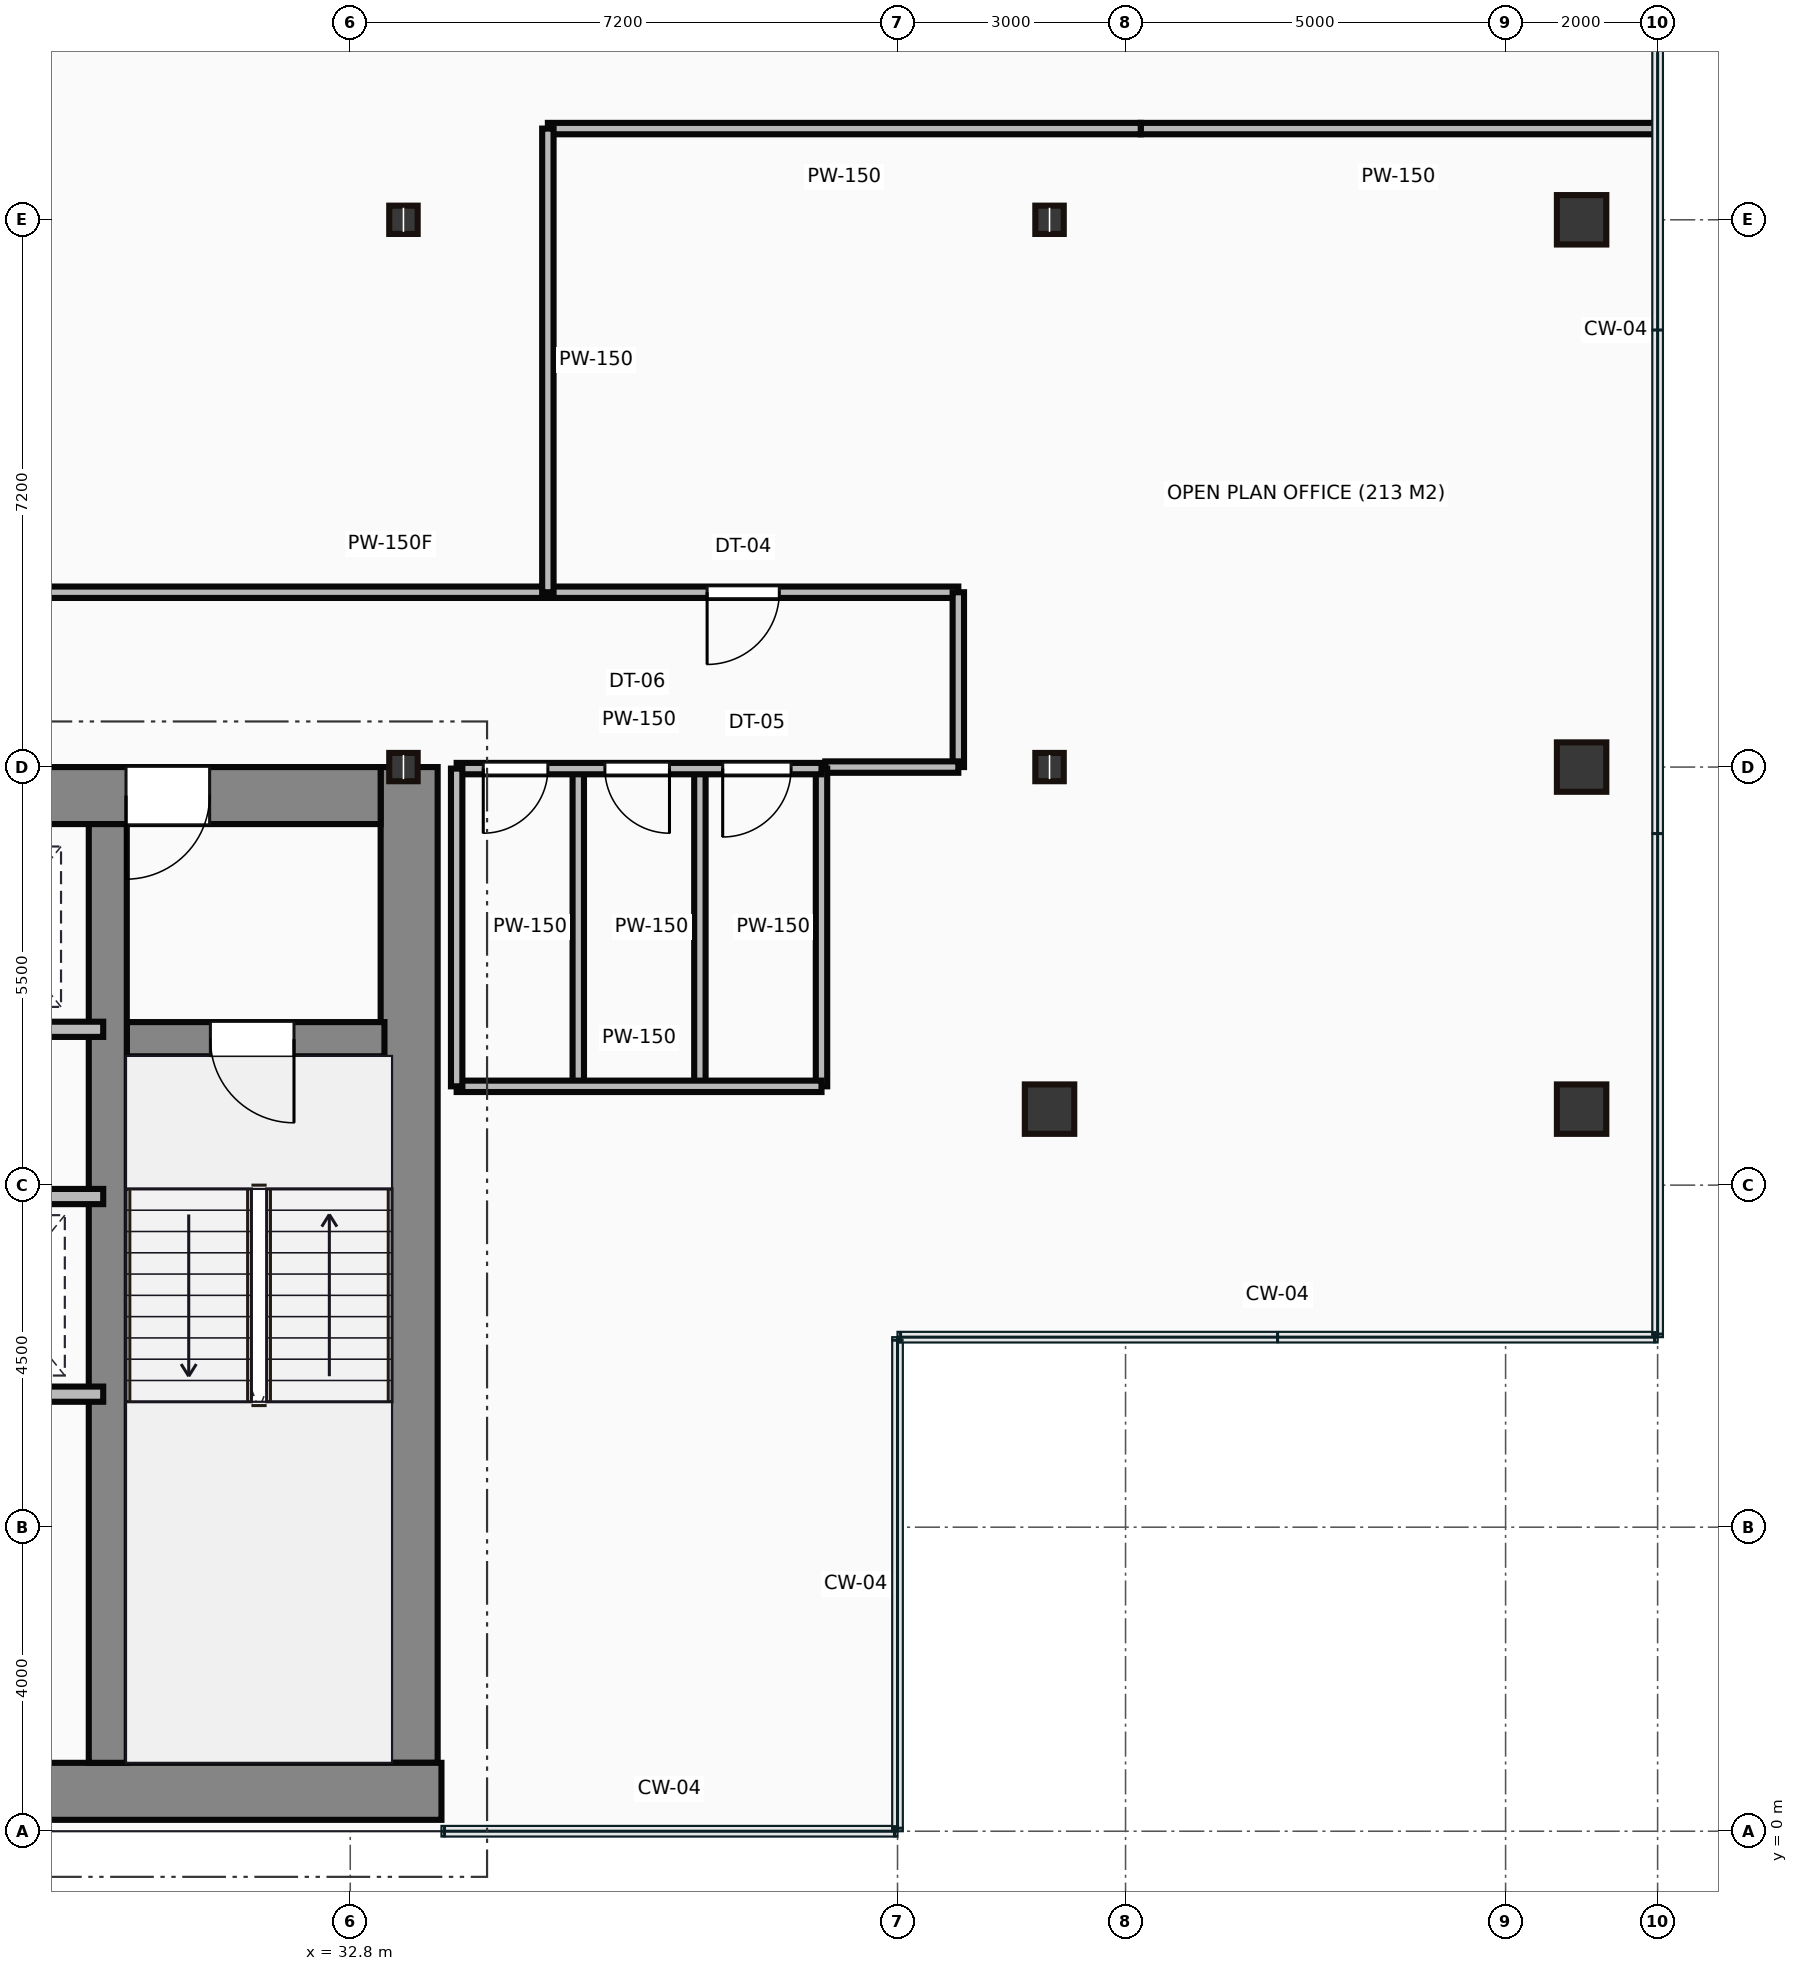
"""IFC4 building model, lengths in metres.
Left out: names, types, materials, properties, quantities, classifications, styles, units other than length and angle.
Written with IfcOpenShell. Run it as: python <this file> out.ifc"""

import sys

from ifc_helpers import new_model, si_unit, direction, frame, frame_2d, origin, origin_2d, place, context, subcontext, project, spatial, rectangle, hollow_rectangle, i_section, extrude, source, transform, mapped, element, fill, save


model = new_model("IFC4")
c1 = context("Model", 3, precision=1e-05, world=origin(), true_north=direction((0.0, 1.0)))
c2 = subcontext(c1, "Body", "Model", "MODEL_VIEW")
j1 = project(units=[si_unit("LENGTHUNIT", "METRE"), si_unit("PLANEANGLEUNIT", "RADIAN")], contexts=[c1])
p1 = place(None, origin())
s1 = spatial("IfcSite", under=j1, at=p1, CompositionType="ELEMENT")
p2 = place(p1, origin())
s2 = spatial("IfcBuilding", under=s1, at=p2, CompositionType="ELEMENT")
p3 = place(p2, frame((0.0, 0.0, 162.5)))
s3 = spatial("IfcBuildingStorey", under=s2, at=p3, CompositionType="ELEMENT", Elevation=162.5)
m1 = source(origin(), c2, "Body", "SweptSolid", [
    extrude(rectangle(XDim=29.5, YDim=0.75, at=frame_2d((14.75, 0.0))), origin(), (0.0, 0.0, 1.0), 3.65),
])
p4 = place(p3, frame((4.5, 0.525, 0.0), z_axis=(0.0, 0.0, 1.0), x_axis=(1.0, 0.0, 0.0)))
e1 = element("IfcWall", 1, at=p4, inside=s3, PredefinedType="SHEAR", context=c2, shape_type="MappedRepresentation", body=[
    mapped(m1, transform((0.0, 0.0, 0.0))),
])
m2 = source(origin(), c2, "Body", "SweptSolid", [
    extrude(rectangle(XDim=13.1, YDim=0.75, at=frame_2d((6.55, 0.0))), origin(), (0.0, 0.0, 1.0), 3.65),
])
p5 = place(p3, frame((33.575, 0.9, 0.0), z_axis=(0.0, 0.0, 1.0), x_axis=(0.0, 1.0, 0.0)))
e2 = element("IfcWall", 2, at=p5, inside=s3, PredefinedType="SHEAR", context=c2, shape_type="MappedRepresentation", body=[
    mapped(m2, transform((0.0, 0.0, 0.0))),
])
m3 = source(origin(), c2, "Body", "SweptSolid", [
    extrude(rectangle(XDim=12.6, YDim=0.75, at=frame_2d((6.3, 0.0))), origin(), (0.0, 0.0, 1.0), 3.65),
])
p6 = place(p3, frame((20.6, 13.625, 0.0), z_axis=(0.0, 0.0, 1.0), x_axis=(1.0, 0.0, 0.0)))
e3 = element("IfcWall", 3, at=p6, inside=s3, PredefinedType="SHEAR", context=c2, shape_type="MappedRepresentation", body=[
    mapped(m3, transform((0.0, 0.0, 0.0))),
])
p7 = place(p6, frame((9.25, 0.0, 0.0)))
e4 = element("IfcOpeningElement", 4, at=p7, cuts=e3, PredefinedType="OPENING", context=c2, shape_type="SweptSolid", body=[
    extrude(rectangle(XDim=1.1, YDim=2.15, at=frame_2d((0.55, 1.075))), frame((0.0, 0.385, 0.0), z_axis=(0.0, -1.0, 0.0), x_axis=(1.0, 0.0, 0.0)), (0.0, 0.0, 1.0), 0.77),
])
m4 = source(origin(), c2, "Body", "SweptSolid", [
    extrude(rectangle(XDim=12.35, YDim=0.5, at=frame_2d((6.175, 0.0))), origin(), (0.0, 0.0, 1.0), 3.65),
])
p8 = place(p3, frame((29.61, 0.9, 0.0), z_axis=(0.0, 0.0, 1.0), x_axis=(0.0, 1.0, 0.0)))
e5 = element("IfcWall", 5, at=p8, inside=s3, PredefinedType="SHEAR", context=c2, shape_type="MappedRepresentation", body=[
    mapped(m4, transform((0.0, 0.0, 0.0))),
])
m5 = source(origin(), c2, "Body", "SweptSolid", [
    extrude(rectangle(XDim=3.39, YDim=0.45, at=frame_2d((1.695, 0.0))), origin(), (0.0, 0.0, 1.0), 3.65),
])
p9 = place(p3, frame((29.86, 10.42, 0.0), z_axis=(0.0, 0.0, 1.0), x_axis=(1.0, 0.0, 0.0)))
e6 = element("IfcWall", 6, at=p9, inside=s3, PredefinedType="SHEAR", context=c2, shape_type="MappedRepresentation", body=[
    mapped(m5, transform((0.0, 0.0, 0.0))),
])
p10 = place(p9, frame((1.1, 0.0, 0.0)))
e7 = element("IfcOpeningElement", 7, at=p10, cuts=e6, PredefinedType="OPENING", context=c2, shape_type="SweptSolid", body=[
    extrude(rectangle(XDim=1.1, YDim=2.15, at=frame_2d((0.55, 1.075))), frame((0.0, 0.235, 0.0), z_axis=(0.0, -1.0, 0.0), x_axis=(1.0, 0.0, 0.0)), (0.0, 0.0, 1.0), 0.47),
])
m6 = source(origin(), c2, "Body", "SweptSolid", [
    extrude(i_section(OverallWidth=0.374, OverallDepth=0.372, WebThickness=0.016, FlangeThickness=0.026, at=origin_2d()), origin(), (0.0, 0.0, 1.0), 3.65),
])
for number, where, z_axis, x_axis in (
    (8, (33.5, 14.0, 0.0), (0.0, 0.0, 1.0), (1.0, 0.0, 0.0)),
    (9, (33.5, 21.2, 0.0), (0.0, 0.0, 1.0), (1.0, 0.0, 0.0)),
):
    element("IfcColumn", number, at=place(p3, frame(where, z_axis=z_axis, x_axis=x_axis)), inside=s3, PredefinedType="COLUMN", context=c2, shape_type="MappedRepresentation", body=[
        mapped(m6, transform((0.0, 0.0, 0.0))),
    ])
m7 = source(origin(), c2, "Body", "SweptSolid", [
    extrude(hollow_rectangle(XDim=0.65, YDim=0.65, WallThickness=0.032, at=origin_2d()), origin(), (0.0, 0.0, 1.0), 3.65),
])
p11 = place(p3, frame((42.0, 9.5, 0.0), z_axis=(0.0, 0.0, 1.0), x_axis=(1.0, 0.0, 0.0)))
e10 = element("IfcColumn", 10, at=p11, inside=s3, PredefinedType="COLUMN", context=c2, shape_type="MappedRepresentation", body=[
    mapped(m7, transform((0.0, 0.0, 0.0))),
])
for number, where, z_axis, x_axis in (
    (11, (42.0, 14.0, 0.0), (0.0, 0.0, 1.0), (1.0, 0.0, 0.0)),
    (12, (42.0, 21.2, 0.0), (0.0, 0.0, 1.0), (1.0, 0.0, 0.0)),
):
    element("IfcColumn", number, at=place(p3, frame(where, z_axis=z_axis, x_axis=x_axis)), inside=s3, PredefinedType="COLUMN", context=c2, shape_type="MappedRepresentation", body=[
        mapped(m6, transform((0.0, 0.0, 0.0))),
    ])
for number, where, z_axis, x_axis in (
    (13, (49.0, 9.5, 0.0), (0.0, 0.0, 1.0), (1.0, 0.0, 0.0)),
    (14, (49.0, 14.0, 0.0), (0.0, 0.0, 1.0), (1.0, 0.0, 0.0)),
    (15, (49.0, 21.2, 0.0), (0.0, 0.0, 1.0), (1.0, 0.0, 0.0)),
):
    element("IfcColumn", number, at=place(p3, frame(where, z_axis=z_axis, x_axis=x_axis)), inside=s3, PredefinedType="COLUMN", context=c2, shape_type="MappedRepresentation", body=[
        mapped(m7, transform((0.0, 0.0, 0.0))),
    ])
m8 = source(origin(), c2, "Body", "SweptSolid", [
    extrude(rectangle(XDim=8.8, YDim=0.2, at=frame_2d((4.4, 0.0))), origin(), (0.0, 0.0, 1.0), 3.4),
])
p12 = place(p3, frame((20.75, 10.55, 0.0), z_axis=(0.0, 0.0, 1.0), x_axis=(1.0, 0.0, 0.0)))
e16 = element("IfcWall", 16, at=p12, inside=s3, PredefinedType="PARTITIONING", context=c2, shape_type="MappedRepresentation", body=[
    mapped(m8, transform((0.0, 0.0, 0.0))),
])
m9 = source(origin(), c2, "Body", "SweptSolid", [
    extrude(rectangle(XDim=4.55, YDim=0.2, at=frame_2d((2.275, 0.0))), origin(), (0.0, 0.0, 1.0), 3.4),
])
for number, where, z_axis, x_axis in (
    (17, (25.0, 8.35, 0.0), (0.0, 0.0, 1.0), (1.0, 0.0, 0.0)),
    (18, (25.0, 5.75, 0.0), (0.0, 0.0, 1.0), (1.0, 0.0, 0.0)),
):
    element("IfcWall", number, at=place(p3, frame(where, z_axis=z_axis, x_axis=x_axis)), inside=s3, PredefinedType="PARTITIONING", context=c2, shape_type="MappedRepresentation", body=[
        mapped(m9, transform((0.0, 0.0, 0.0))),
    ])
m10 = source(origin(), c2, "Body", "SweptSolid", [
    extrude(rectangle(XDim=4.8, YDim=0.15, at=frame_2d((2.4, 0.0))), origin(), (0.0, 0.0, 1.0), 2.76),
])
p13 = place(p3, frame((34.2, 13.98, 0.0), z_axis=(0.0, 0.0, 1.0), x_axis=(1.0, 0.0, 0.0)))
e19 = element("IfcWall", 19, at=p13, inside=s3, PredefinedType="PARTITIONING", context=c2, shape_type="MappedRepresentation", body=[
    mapped(m10, transform((0.0, 0.0, 0.0))),
])
p14 = place(p13, frame((0.35, 0.0, 0.0)))
e20 = element("IfcOpeningElement", 20, at=p14, cuts=e19, PredefinedType="OPENING", context=c2, shape_type="SweptSolid", body=[
    extrude(rectangle(XDim=0.85, YDim=2.1, at=frame_2d((0.425, 1.05))), frame((0.0, 0.085, 0.0), z_axis=(0.0, -1.0, 0.0), x_axis=(1.0, 0.0, 0.0)), (0.0, 0.0, 1.0), 0.17),
])
p15 = place(p13, frame((1.95, 0.0, 0.0)))
e21 = element("IfcOpeningElement", 21, at=p15, cuts=e19, PredefinedType="OPENING", context=c2, shape_type="SweptSolid", body=[
    extrude(rectangle(XDim=0.85, YDim=2.1, at=frame_2d((0.425, 1.05))), frame((0.0, 0.085, 0.0), z_axis=(0.0, -1.0, 0.0), x_axis=(1.0, 0.0, 0.0)), (0.0, 0.0, 1.0), 0.17),
])
p16 = place(p13, frame((3.5, 0.0, 0.0)))
e22 = element("IfcOpeningElement", 22, at=p16, cuts=e19, PredefinedType="OPENING", context=c2, shape_type="SweptSolid", body=[
    extrude(rectangle(XDim=0.9, YDim=2.1, at=frame_2d((0.45, 1.05))), frame((0.0, 0.085, 0.0), z_axis=(0.0, -1.0, 0.0), x_axis=(1.0, 0.0, 0.0)), (0.0, 0.0, 1.0), 0.17),
])
m11 = source(origin(), c2, "Body", "SweptSolid", [
    extrude(rectangle(XDim=4.8, YDim=0.15, at=frame_2d((2.4, 0.0))), origin(), (0.0, 0.0, 1.0), 3.4),
])
p17 = place(p3, frame((34.2, 9.8, 0.0), z_axis=(0.0, 0.0, 1.0), x_axis=(1.0, 0.0, 0.0)))
e23 = element("IfcWall", 23, at=p17, inside=s3, PredefinedType="PARTITIONING", context=c2, shape_type="MappedRepresentation", body=[
    mapped(m11, transform((0.0, 0.0, 0.0))),
])
m12 = source(origin(), c2, "Body", "SweptSolid", [
    extrude(rectangle(XDim=4.18, YDim=0.15, at=frame_2d((2.09, 0.0))), origin(), (0.0, 0.0, 1.0), 3.4),
])
for number, where, z_axis, x_axis in (
    (24, (39.0, 9.8, 0.0), (0.0, 0.0, 1.0), (0.0, 1.0, 0.0)),
    (25, (34.2, 9.8, 0.0), (0.0, 0.0, 1.0), (0.0, 1.0, 0.0)),
    (26, (35.8, 9.8, 0.0), (0.0, 0.0, 1.0), (0.0, 1.0, 0.0)),
    (27, (37.4, 9.8, 0.0), (0.0, 0.0, 1.0), (0.0, 1.0, 0.0)),
):
    element("IfcWall", number, at=place(p3, frame(where, z_axis=z_axis, x_axis=x_axis)), inside=s3, PredefinedType="PARTITIONING", context=c2, shape_type="MappedRepresentation", body=[
        mapped(m12, transform((0.0, 0.0, 0.0))),
    ])
m13 = source(origin(), c2, "Body", "SweptSolid", [
    extrude(rectangle(XDim=14.95, YDim=0.15, at=frame_2d((7.475, 0.0))), origin(), (0.0, 0.0, 1.0), 3.4),
])
p18 = place(p3, frame((25.85, 16.3, 0.0), z_axis=(0.0, 0.0, 1.0), x_axis=(1.0, 0.0, 0.0)))
e28 = element("IfcWall", 28, at=p18, inside=s3, PredefinedType="PARTITIONING", context=c2, shape_type="MappedRepresentation", body=[
    mapped(m13, transform((0.0, 0.0, 0.0))),
])
p19 = place(p18, frame((11.645, 0.0, 0.0)))
e29 = element("IfcOpeningElement", 29, at=p19, cuts=e28, PredefinedType="OPENING", context=c2, shape_type="SweptSolid", body=[
    extrude(rectangle(XDim=0.95, YDim=2.15, at=frame_2d((0.475, 1.075))), frame((0.0, 0.085, 0.0), z_axis=(0.0, -1.0, 0.0), x_axis=(1.0, 0.0, 0.0)), (0.0, 0.0, 1.0), 0.17),
])
m14 = source(origin(), c2, "Body", "SweptSolid", [
    extrude(rectangle(XDim=2.3, YDim=0.15, at=frame_2d((1.15, 0.0))), origin(), (0.0, 0.0, 1.0), 3.4),
])
p20 = place(p3, frame((40.8, 16.3, 0.0), z_axis=(0.0, 0.0, 1.0), x_axis=(0.0, -1.0, 0.0)))
e30 = element("IfcWall", 30, at=p20, inside=s3, PredefinedType="PARTITIONING", context=c2, shape_type="MappedRepresentation", body=[
    mapped(m14, transform((0.0, 0.0, 0.0))),
])
m15 = source(origin(), c2, "Body", "SweptSolid", [
    extrude(rectangle(XDim=1.75, YDim=0.15, at=frame_2d((0.875, 0.0))), origin(), (0.0, 0.0, 1.0), 2.76),
])
p21 = place(p3, frame((40.8, 14.0, 0.0), z_axis=(0.0, 0.0, 1.0), x_axis=(-1.0, 0.0, 0.0)))
e31 = element("IfcWall", 31, at=p21, inside=s3, PredefinedType="PARTITIONING", context=c2, shape_type="MappedRepresentation", body=[
    mapped(m15, transform((0.0, 0.0, 0.0))),
])
m16 = source(origin(), c2, "Body", "SweptSolid", [
    extrude(rectangle(XDim=6.78, YDim=0.15, at=frame_2d((3.39, 0.0))), origin(), (0.0, 0.0, 1.0), 3.4),
])
p22 = place(p3, frame((49.98, 22.4, 0.0), z_axis=(0.0, 0.0, 1.0), x_axis=(-1.0, 0.0, 0.0)))
e32 = element("IfcWall", 32, at=p22, inside=s3, PredefinedType="PARTITIONING", context=c2, shape_type="MappedRepresentation", body=[
    mapped(m16, transform((0.0, 0.0, 0.0))),
])
m17 = source(origin(), c2, "Body", "SweptSolid", [
    extrude(rectangle(XDim=7.8, YDim=0.15, at=frame_2d((3.9, 0.0))), origin(), (0.0, 0.0, 1.0), 3.4),
])
p23 = place(p3, frame((43.2, 22.4, 0.0), z_axis=(0.0, 0.0, 1.0), x_axis=(-1.0, 0.0, 0.0)))
e33 = element("IfcWall", 33, at=p23, inside=s3, PredefinedType="PARTITIONING", context=c2, shape_type="MappedRepresentation", body=[
    mapped(m17, transform((0.0, 0.0, 0.0))),
])
m18 = source(origin(), c2, "Body", "SweptSolid", [
    extrude(rectangle(XDim=6.1, YDim=0.15, at=frame_2d((3.05, 0.0))), origin(), (0.0, 0.0, 1.0), 3.4),
])
p24 = place(p3, frame((35.4, 22.4, 0.0), z_axis=(0.0, 0.0, 1.0), x_axis=(0.0, -1.0, 0.0)))
e34 = element("IfcWall", 34, at=p24, inside=s3, PredefinedType="PARTITIONING", context=c2, shape_type="MappedRepresentation", body=[
    mapped(m18, transform((0.0, 0.0, 0.0))),
])
m19 = source(origin(), c2, "Body", "SweptSolid", [
    extrude(rectangle(XDim=1.1, YDim=2.15, at=frame_2d((0.55, 1.075))), frame((0.0, 0.025, 0.0), z_axis=(0.0, -1.0, 0.0), x_axis=(1.0, 0.0, 0.0)), (0.0, 0.0, 1.0), 0.05),
])
p25 = place(p10, frame((1.1, 0.0, 0.0), z_axis=(0.0, 0.0, 1.0), x_axis=(-1.0, 0.0, 0.0)))
e35 = element("IfcDoor", 35, at=p25, inside=s3, OperationType="SINGLE_SWING_RIGHT", PredefinedType="DOOR", context=c2, shape_type="MappedRepresentation", body=[
    mapped(m19, transform((0.0, 0.0, 0.0))),
])
fill(e7, e35)
p26 = place(p7, origin())
e36 = element("IfcDoor", 36, at=p26, inside=s3, OperationType="SINGLE_SWING_LEFT", PredefinedType="DOOR", context=c2, shape_type="MappedRepresentation", body=[
    mapped(m19, transform((0.0, 0.0, 0.0))),
])
fill(e4, e36)
m20 = source(origin(), c2, "Body", "SweptSolid", [
    extrude(rectangle(XDim=0.85, YDim=2.1, at=frame_2d((0.425, 1.05))), frame((0.0, 0.025, 0.0), z_axis=(0.0, -1.0, 0.0), x_axis=(1.0, 0.0, 0.0)), (0.0, 0.0, 1.0), 0.05),
])
p27 = place(p14, frame((0.85, 0.0, 0.0), z_axis=(0.0, 0.0, 1.0), x_axis=(-1.0, 0.0, 0.0)))
e37 = element("IfcDoor", 37, at=p27, inside=s3, OperationType="SINGLE_SWING_LEFT", PredefinedType="DOOR", context=c2, shape_type="MappedRepresentation", body=[
    mapped(m20, transform((0.0, 0.0, 0.0))),
])
fill(e20, e37)
p28 = place(p15, frame((0.85, 0.0, 0.0), z_axis=(0.0, 0.0, 1.0), x_axis=(-1.0, 0.0, 0.0)))
e38 = element("IfcDoor", 38, at=p28, inside=s3, OperationType="SINGLE_SWING_RIGHT", PredefinedType="DOOR", context=c2, shape_type="MappedRepresentation", body=[
    mapped(m20, transform((0.0, 0.0, 0.0))),
])
fill(e21, e38)
m21 = source(origin(), c2, "Body", "SweptSolid", [
    extrude(rectangle(XDim=0.9, YDim=2.1, at=frame_2d((0.45, 1.05))), frame((0.0, 0.025, 0.0), z_axis=(0.0, -1.0, 0.0), x_axis=(1.0, 0.0, 0.0)), (0.0, 0.0, 1.0), 0.05),
])
p29 = place(p16, frame((0.9, 0.0, 0.0), z_axis=(0.0, 0.0, 1.0), x_axis=(-1.0, 0.0, 0.0)))
e39 = element("IfcDoor", 39, at=p29, inside=s3, OperationType="SINGLE_SWING_LEFT", PredefinedType="DOOR", context=c2, shape_type="MappedRepresentation", body=[
    mapped(m21, transform((0.0, 0.0, 0.0))),
])
fill(e22, e39)
m22 = source(origin(), c2, "Body", "SweptSolid", [
    extrude(rectangle(XDim=0.95, YDim=2.15, at=frame_2d((0.475, 1.075))), frame((0.0, 0.025, 0.0), z_axis=(0.0, -1.0, 0.0), x_axis=(1.0, 0.0, 0.0)), (0.0, 0.0, 1.0), 0.05),
])
p30 = place(p19, origin())
e40 = element("IfcDoor", 40, at=p30, inside=s3, OperationType="SINGLE_SWING_LEFT", PredefinedType="DOOR", context=c2, shape_type="MappedRepresentation", body=[
    mapped(m22, transform((0.0, 0.0, 0.0))),
])
fill(e29, e40)
save(model, sys.argv[1])
